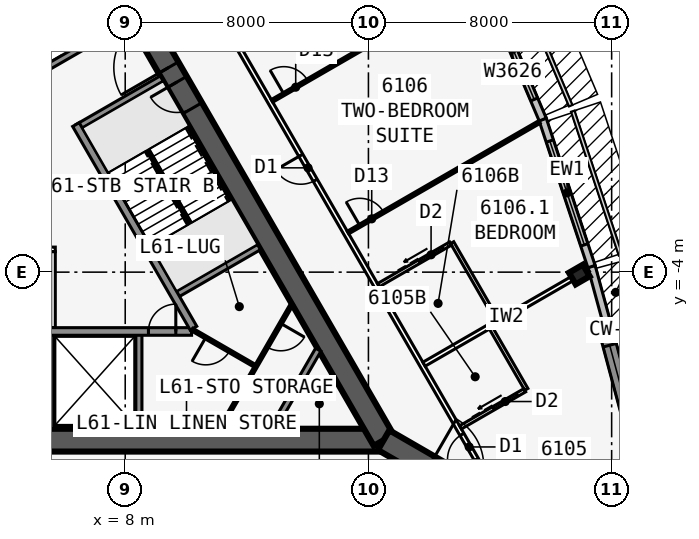
"""IFC4 building model, lengths in metres.
Left out: names, types, materials, properties, quantities, classifications, styles, units other than length and angle.
Written with IfcOpenShell. Run it as: python <this file> out.ifc"""

import sys

from ifc_helpers import new_model, si_unit, direction, frame, frame_2d, origin, origin_2d, place, context, subcontext, project, spatial, polyline, rectangle, i_section, outline, extrude, element, fill, save


model = new_model("IFC4")
c1 = context("Model", 3, precision=1e-05, world=origin(), true_north=direction((0.0, 1.0)))
c2 = subcontext(c1, "Body", "Model", "MODEL_VIEW")
j1 = project(units=[si_unit("LENGTHUNIT", "METRE"), si_unit("PLANEANGLEUNIT", "RADIAN")], contexts=[c1])
p1 = place(None, origin())
s1 = spatial("IfcSite", under=j1, at=p1, CompositionType="ELEMENT")
p2 = place(p1, origin())
s2 = spatial("IfcBuilding", under=s1, at=p2, CompositionType="ELEMENT")
p3 = place(p2, frame((0.0, 0.0, 229.7)))
s3 = spatial("IfcBuildingStorey", under=s2, at=p3, CompositionType="ELEMENT", Elevation=229.7)
p4 = place(p3, frame((-16.5, -9.526, 0.0), z_axis=(0.0, 0.0, 1.0), x_axis=(1.0, 0.0, 0.0)))
e1 = element("IfcWall", 1, at=p4, inside=s3, PredefinedType="SHEAR", context=c2, shape_type="SweptSolid", body=[
    extrude(rectangle(XDim=33.0, YDim=0.75, at=frame_2d((16.5, 0.0))), origin(), (0.0, 0.0, 1.0), 3.6),
])
p5 = place(p4, frame((14.05, 0.0, 0.0)))
e2 = element("IfcOpeningElement", 2, at=p5, cuts=e1, PredefinedType="OPENING", context=c2, shape_type="SweptSolid", body=[
    extrude(rectangle(XDim=1.8, YDim=2.13, at=frame_2d((0.9, 1.065))), frame((0.0, 0.385, 0.0), z_axis=(0.0, -1.0, 0.0), x_axis=(1.0, 0.0, 0.0)), (0.0, 0.0, 1.0), 0.77),
])
p6 = place(p3, frame((-0.55, -5.951, 0.0), z_axis=(0.0, 0.0, 1.0), x_axis=(1.0, 0.0, 0.0)))
e3 = element("IfcWall", 3, at=p6, inside=s3, PredefinedType="SOLIDWALL", context=c2, shape_type="SweptSolid", body=[
    extrude(rectangle(XDim=10.733, YDim=0.25, at=frame_2d((5.366, 0.0))), origin(), (0.0, 0.0, 1.0), 3.35),
])
p7 = place(p6, frame((9.314, 0.0, 0.0)))
e4 = element("IfcOpeningElement", 4, at=p7, cuts=e3, PredefinedType="OPENING", context=c2, shape_type="SweptSolid", body=[
    extrude(rectangle(XDim=0.9, YDim=2.13, at=frame_2d((0.45, 1.065))), frame((0.0, 0.135, 0.0), z_axis=(0.0, -1.0, 0.0), x_axis=(1.0, 0.0, 0.0)), (0.0, 0.0, 1.0), 0.27),
])
p8 = place(p6, frame((1.05, 0.0, 0.0)))
e5 = element("IfcOpeningElement", 5, at=p8, cuts=e3, PredefinedType="OPENING", context=c2, shape_type="SweptSolid", body=[
    extrude(rectangle(XDim=1.1, YDim=2.13, at=frame_2d((0.55, 1.065))), frame((0.0, 0.135, 0.0), z_axis=(0.0, -1.0, 0.0), x_axis=(1.0, 0.0, 0.0)), (0.0, 0.0, 1.0), 0.27),
])
p9 = place(p6, frame((4.05, 0.0, 0.0)))
e6 = element("IfcOpeningElement", 6, at=p9, cuts=e3, PredefinedType="OPENING", context=c2, shape_type="SweptSolid", body=[
    extrude(rectangle(XDim=1.1, YDim=2.13, at=frame_2d((0.55, 1.065))), frame((0.0, 0.135, 0.0), z_axis=(0.0, -1.0, 0.0), x_axis=(1.0, 0.0, 0.0)), (0.0, 0.0, 1.0), 0.27),
])
for number, where, z_axis, x_axis in (
    (7, (5.55, -5.951, 0.0), (0.0, 0.0, 1.0), (0.0, -1.0, 0.0)),
    (8, (8.45, -5.951, 0.0), (0.0, 0.0, 1.0), (0.0, -1.0, 0.0)),
):
    element("IfcWall", number, at=place(p3, frame(where, z_axis=z_axis, x_axis=x_axis)), inside=s3, PredefinedType="SOLIDWALL", context=c2, shape_type="SweptSolid", body=[
        extrude(rectangle(XDim=3.2, YDim=0.2, at=frame_2d((1.6, 0.0))), origin(), (0.0, 0.0, 1.0), 3.35),
    ])
p10 = place(p3, frame((16.5, -9.526, 0.0), z_axis=(0.0, 0.0, 1.0), x_axis=(-0.499999749417, 0.866025548458, 0.0)))
e9 = element("IfcWall", 9, at=p10, inside=s3, PredefinedType="SHEAR", context=c2, shape_type="SweptSolid", body=[
    extrude(rectangle(XDim=33.0, YDim=0.75, at=frame_2d((16.5, 0.0))), origin(), (0.0, 0.0, 1.0), 3.6),
])
p11 = place(p10, frame((14.15, 0.0, 0.0)))
e10 = element("IfcOpeningElement", 10, at=p11, cuts=e9, PredefinedType="OPENING", context=c2, shape_type="SweptSolid", body=[
    extrude(rectangle(XDim=1.8, YDim=2.13, at=frame_2d((0.9, 1.065))), frame((0.0, 0.385, 0.0), z_axis=(0.0, -1.0, 0.0), x_axis=(1.0, 0.0, 0.0)), (0.0, 0.0, 1.0), 0.77),
])
p12 = place(p10, frame((12.6, 0.0, 0.0)))
e11 = element("IfcOpeningElement", 11, at=p12, cuts=e9, PredefinedType="OPENING", context=c2, shape_type="SweptSolid", body=[
    extrude(rectangle(XDim=1.0, YDim=2.13, at=frame_2d((0.5, 1.065))), frame((0.0, 0.385, 0.0), z_axis=(0.0, -1.0, 0.0), x_axis=(1.0, 0.0, 0.0)), (0.0, 0.0, 1.0), 0.77),
])
p13 = place(p3, frame((10.245, -5.843, 0.0), z_axis=(0.0, 0.0, 1.0), x_axis=(-0.499993009313, 0.866029439822, 0.0)))
e12 = element("IfcWall", 12, at=p13, inside=s3, PredefinedType="SOLIDWALL", context=c2, shape_type="SweptSolid", body=[
    extrude(rectangle(XDim=7.733, YDim=0.25, at=frame_2d((3.866, 0.0))), origin(), (0.0, 0.0, 1.0), 3.35),
])
for number, where, z_axis, x_axis in (
    (13, (9.629, -4.775, 0.0), (0.0, 0.0, 1.0), (0.866, 0.5, 0.0)),
    (14, (6.429, 0.767, 0.0), (0.0, 0.0, 1.0), (0.866, 0.5, 0.0)),
):
    element("IfcWall", number, at=place(p3, frame(where, z_axis=z_axis, x_axis=x_axis)), inside=s3, PredefinedType="SOLIDWALL", context=c2, shape_type="SweptSolid", body=[
        extrude(rectangle(XDim=3.2, YDim=0.2, at=frame_2d((1.6, 0.0))), origin(), (0.0, 0.0, 1.0), 3.35),
    ])
p14 = place(p3, frame((5.329, 2.673, 0.0), z_axis=(0.0, 0.0, 1.0), x_axis=(0.866022944154, 0.50000426018, 0.0)))
e15 = element("IfcWall", 15, at=p14, inside=s3, PredefinedType="SOLIDWALL", context=c2, shape_type="SweptSolid", body=[
    extrude(rectangle(XDim=3.2, YDim=0.2, at=frame_2d((1.6, 0.0))), origin(), (0.0, 0.0, 1.0), 3.35),
])
p15 = place(p3, frame((16.5, -9.526, 0.0), z_axis=(0.0, 0.0, 1.0), x_axis=(0.866031398331, -0.499989616998, 0.0)))
e16 = element("IfcWall", 16, at=p15, inside=s3, PredefinedType="SHEAR", context=c2, shape_type="SweptSolid", body=[
    extrude(rectangle(XDim=4.746, YDim=0.75, at=frame_2d((2.373, 0.0))), origin(), (0.0, 0.0, 1.0), 3.6),
])
p16 = place(p15, frame((1.725, 0.0, 0.0)))
e17 = element("IfcOpeningElement", 17, at=p16, cuts=e16, PredefinedType="OPENING", context=c2, shape_type="SweptSolid", body=[
    extrude(rectangle(XDim=1.8, YDim=2.13, at=frame_2d((0.9, 1.065))), frame((0.0, 0.385, 0.0), z_axis=(0.0, -1.0, 0.0), x_axis=(1.0, 0.0, 0.0)), (0.0, 0.0, 1.0), 0.77),
])
p17 = place(p3, frame((22.937, -4.078, 0.0), z_axis=(0.0, 0.0, 1.0), x_axis=(-0.5, 0.866025403784, 0.0)))
e18 = element("IfcColumn", 18, at=p17, inside=s3, PredefinedType="COLUMN", context=c2, shape_type="SweptSolid", body=[
    extrude(i_section(OverallWidth=0.442, OverallDepth=0.531, WebThickness=0.066, FlangeThickness=0.106, at=origin_2d()), origin(), (0.0, 0.0, 1.0), 3.6),
])
p18 = place(p3, frame((23.783, -13.798, 0.0), z_axis=(0.0, 0.0, 1.0), x_axis=(0.258799282522, 0.96593112144, 0.0)))
e19 = element("IfcWall", 19, at=p18, inside=s3, PredefinedType="SOLIDWALL", context=c2, shape_type="SweptSolid", body=[
    extrude(outline(polyline([(4.184, 0.225), (0.509, 0.225), (0.479, 0.113), (0.059, 0.225), (0.0, 0.225), (0.0, -0.225), (4.184, -0.225), (4.184, 0.225)])), origin(), (0.0, 0.0, 1.0), 3.35),
])
p19 = place(p18, frame((1.071, 0.0, 0.45)))
e20 = element("IfcOpeningElement", 20, at=p19, cuts=e19, PredefinedType="OPENING", context=c2, shape_type="SweptSolid", body=[
    extrude(rectangle(XDim=2.4, YDim=2.6, at=frame_2d((1.2, 1.3))), frame((0.0, 0.235, 0.0), z_axis=(0.0, -1.0, 0.0), x_axis=(1.0, 0.0, 0.0)), (0.0, 0.0, 1.0), 0.47),
])
p20 = place(p3, frame((24.865, -9.873, 0.0), z_axis=(0.0, 0.0, 1.0), x_axis=(-0.258784695888, 0.965935029479, 0.0)))
e21 = element("IfcWall", 21, at=p20, inside=s3, PredefinedType="SOLIDWALL", context=c2, shape_type="SweptSolid", body=[
    extrude(rectangle(XDim=4.184, YDim=0.45, at=frame_2d((2.092, 0.0))), origin(), (0.0, 0.0, 1.0), 3.35),
])
p21 = place(p20, frame((0.592, 0.0, 0.45)))
e22 = element("IfcOpeningElement", 22, at=p21, cuts=e21, PredefinedType="OPENING", context=c2, shape_type="SweptSolid", body=[
    extrude(rectangle(XDim=3.0, YDim=2.6, at=frame_2d((1.5, 1.3))), frame((0.0, 0.235, 0.0), z_axis=(0.0, -1.0, 0.0), x_axis=(1.0, 0.0, 0.0)), (0.0, 0.0, 1.0), 0.47),
])
p22 = place(p3, frame((23.879, -5.806, 0.0), z_axis=(0.0, 0.0, 1.0), x_axis=(-0.262867703986, 0.964831887015, 0.0)))
e23 = element("IfcWall", 23, at=p22, inside=s3, PredefinedType="STANDARD", context=c2, shape_type="SweptSolid", body=[
    extrude(rectangle(XDim=2.068, YDim=0.25, at=frame_2d((1.034, 0.0))), origin(), (0.0, 0.0, 1.0), 3.35),
])
p23 = place(p3, frame((23.338, -3.817, 0.0), z_axis=(0.0, 0.0, 1.0), x_axis=(-0.315108478109, 0.949055660656, 0.0)))
e24 = element("IfcWall", 24, at=p23, inside=s3, PredefinedType="STANDARD", context=c2, shape_type="SweptSolid", body=[
    extrude(rectangle(XDim=5.105, YDim=0.25, at=frame_2d((2.552, 0.0))), origin(), (0.0, 0.0, 1.0), 3.35),
])
p24 = place(p23, frame((0.752, 0.0, 0.45)))
e25 = element("IfcOpeningElement", 25, at=p24, cuts=e24, PredefinedType="OPENING", context=c2, shape_type="SweptSolid", body=[
    extrude(rectangle(XDim=3.6, YDim=2.6, at=frame_2d((1.8, 1.3))), frame((0.0, 0.135, 0.0), z_axis=(0.0, -1.0, 0.0), x_axis=(1.0, 0.0, 0.0)), (0.0, 0.0, 1.0), 0.27),
])
p25 = place(p3, frame((21.733, 1.018, 0.0), z_axis=(0.0, 0.0, 1.0), x_axis=(-0.390096809471, 0.920773848044, 0.0)))
e26 = element("IfcWall", 26, at=p25, inside=s3, PredefinedType="STANDARD", context=c2, shape_type="SweptSolid", body=[
    extrude(rectangle(XDim=5.038, YDim=0.25, at=frame_2d((2.519, 0.0))), origin(), (0.0, 0.0, 1.0), 3.35),
])
p26 = place(p25, frame((0.719, 0.0, 0.45)))
e27 = element("IfcOpeningElement", 27, at=p26, cuts=e26, PredefinedType="OPENING", context=c2, shape_type="SweptSolid", body=[
    extrude(rectangle(XDim=3.6, YDim=2.6, at=frame_2d((1.8, 1.3))), frame((0.0, 0.135, 0.0), z_axis=(0.0, -1.0, 0.0), x_axis=(1.0, 0.0, 0.0)), (0.0, 0.0, 1.0), 0.27),
])
p27 = place(p3, frame((20.102, -11.115, 0.0), z_axis=(0.0, 0.0, 1.0), x_axis=(-0.500000265775, 0.866025250339, 0.0)))
e28 = element("IfcWall", 28, at=p27, inside=s3, PredefinedType="PARTITIONING", context=c2, shape_type="SweptSolid", body=[
    extrude(rectangle(XDim=39.354, YDim=0.15, at=frame_2d((19.677, 0.0))), origin(), (0.0, 0.0, 1.0), 3.35),
])
p28 = place(p27, frame((1.102, 0.0, 0.0)))
e29 = element("IfcOpeningElement", 29, at=p28, cuts=e28, PredefinedType="OPENING", context=c2, shape_type="SweptSolid", body=[
    extrude(rectangle(XDim=0.95, YDim=2.13, at=frame_2d((0.475, 1.065))), frame((0.0, 0.085, 0.0), z_axis=(0.0, -1.0, 0.0), x_axis=(1.0, 0.0, 0.0)), (0.0, 0.0, 1.0), 0.17),
])
p29 = place(p27, frame((11.702, 0.0, 0.0)))
e30 = element("IfcOpeningElement", 30, at=p29, cuts=e28, PredefinedType="OPENING", context=c2, shape_type="SweptSolid", body=[
    extrude(rectangle(XDim=0.95, YDim=2.13, at=frame_2d((0.475, 1.065))), frame((0.0, 0.085, 0.0), z_axis=(0.0, -1.0, 0.0), x_axis=(1.0, 0.0, 0.0)), (0.0, 0.0, 1.0), 0.17),
])
p30 = place(p27, frame((26.702, 0.0, 0.0)))
e31 = element("IfcOpeningElement", 31, at=p30, cuts=e28, PredefinedType="OPENING", context=c2, shape_type="SweptSolid", body=[
    extrude(rectangle(XDim=0.95, YDim=2.13, at=frame_2d((0.475, 1.065))), frame((0.0, 0.085, 0.0), z_axis=(0.0, -1.0, 0.0), x_axis=(1.0, 0.0, 0.0)), (0.0, 0.0, 1.0), 0.17),
])
p31 = place(p27, frame((37.302, 0.0, 0.0)))
e32 = element("IfcOpeningElement", 32, at=p31, cuts=e28, PredefinedType="OPENING", context=c2, shape_type="SweptSolid", body=[
    extrude(rectangle(XDim=0.95, YDim=2.13, at=frame_2d((0.475, 1.065))), frame((0.0, 0.085, 0.0), z_axis=(0.0, -1.0, 0.0), x_axis=(1.0, 0.0, 0.0)), (0.0, 0.0, 1.0), 0.17),
])
p32 = place(p3, frame((17.829, -7.027, 0.0), z_axis=(0.0, 0.0, 1.0), x_axis=(0.866026604282, 0.499997920671, 0.0)))
e33 = element("IfcWall", 33, at=p32, inside=s3, PredefinedType="PARTITIONING", context=c2, shape_type="SweptSolid", body=[
    extrude(rectangle(XDim=6.24, YDim=0.15, at=frame_2d((3.12, 0.0))), origin(), (0.0, 0.0, 1.0), 2.25),
])
p33 = place(p3, frame((15.329, -2.697, 0.0), z_axis=(0.0, 0.0, 1.0), x_axis=(0.866032413668, 0.499987858329, 0.0)))
e34 = element("IfcWall", 34, at=p33, inside=s3, PredefinedType="PARTITIONING", context=c2, shape_type="SweptSolid", body=[
    extrude(rectangle(XDim=7.273, YDim=0.1, at=frame_2d((3.636, 0.0))), origin(), (0.0, 0.0, 1.0), 2.309),
])
p34 = place(p33, frame((0.45, 0.0, 0.0)))
e35 = element("IfcOpeningElement", 35, at=p34, cuts=e34, PredefinedType="OPENING", context=c2, shape_type="SweptSolid", body=[
    extrude(rectangle(XDim=0.9, YDim=2.13, at=frame_2d((0.45, 1.065))), frame((0.0, 0.06, 0.0), z_axis=(0.0, -1.0, 0.0), x_axis=(1.0, 0.0, 0.0)), (0.0, 0.0, 1.0), 0.12),
])
p35 = place(p3, frame((12.829, 1.633, 0.0), z_axis=(0.0, 0.0, 1.0), x_axis=(0.866030558329, 0.49999107196, 0.0)))
e36 = element("IfcWall", 36, at=p35, inside=s3, PredefinedType="PARTITIONING", context=c2, shape_type="SweptSolid", body=[
    extrude(rectangle(XDim=7.894, YDim=0.1, at=frame_2d((3.947, 0.0))), origin(), (0.0, 0.0, 1.0), 2.25),
])
p36 = place(p35, frame((0.45, 0.0, 0.0)))
e37 = element("IfcOpeningElement", 37, at=p36, cuts=e36, PredefinedType="OPENING", context=c2, shape_type="SweptSolid", body=[
    extrude(rectangle(XDim=0.9, YDim=2.13, at=frame_2d((0.45, 1.065))), frame((0.0, 0.06, 0.0), z_axis=(0.0, -1.0, 0.0), x_axis=(1.0, 0.0, 0.0)), (0.0, 0.0, 1.0), 0.12),
])
p37 = place(p3, frame((21.194, -7.856, 0.0), z_axis=(0.0, 0.0, 1.0), x_axis=(-0.500033551112, 0.866006032174, 0.0)))
e38 = element("IfcWall", 38, at=p37, inside=s3, PredefinedType="PLUMBINGWALL", context=c2, shape_type="SweptSolid", body=[
    extrude(rectangle(XDim=2.4, YDim=0.12, at=frame_2d((1.2, 0.0))), origin(), (0.0, 0.0, 1.0), 3.35),
])
p38 = place(p3, frame((19.029, -9.106, 0.0), z_axis=(0.0, 0.0, 1.0), x_axis=(0.866023955769, 0.500002508028, 0.0)))
e39 = element("IfcWall", 39, at=p38, inside=s3, PredefinedType="PLUMBINGWALL", context=c2, shape_type="SweptSolid", body=[
    extrude(rectangle(XDim=2.44, YDim=0.12, at=frame_2d((1.22, 0.0))), origin(), (0.0, 0.0, 1.0), 3.35),
])
p39 = place(p38, frame((1.25, 0.0, 0.0)))
e40 = element("IfcOpeningElement", 40, at=p39, cuts=e39, PredefinedType="OPENING", context=c2, shape_type="SweptSolid", body=[
    extrude(rectangle(XDim=0.9, YDim=2.13, at=frame_2d((0.45, 1.065))), frame((0.0, 0.07, 0.0), z_axis=(0.0, -1.0, 0.0), x_axis=(1.0, 0.0, 0.0)), (0.0, 0.0, 1.0), 0.14),
])
p40 = place(p3, frame((20.253, -5.627, 0.0), z_axis=(0.0, 0.0, 1.0), x_axis=(-0.50002537861, 0.866010750942, 0.0)))
e41 = element("IfcWall", 41, at=p40, inside=s3, PredefinedType="PLUMBINGWALL", context=c2, shape_type="SweptSolid", body=[
    extrude(rectangle(XDim=3.0, YDim=0.12, at=frame_2d((1.5, 0.0))), origin(), (0.0, 0.0, 1.0), 3.35),
])
p41 = place(p3, frame((16.329, -4.429, 0.0), z_axis=(0.0, 0.0, 1.0), x_axis=(0.865997131366, 0.500048966069, 0.0)))
e42 = element("IfcWall", 42, at=p41, inside=s3, PredefinedType="PLUMBINGWALL", context=c2, shape_type="SweptSolid", body=[
    extrude(rectangle(XDim=2.74, YDim=0.12, at=frame_2d((1.37, 0.0))), origin(), (0.0, 0.0, 1.0), 3.35),
])
p42 = place(p41, frame((1.55, 0.0, 0.0)))
e43 = element("IfcOpeningElement", 43, at=p42, cuts=e42, PredefinedType="OPENING", context=c2, shape_type="SweptSolid", body=[
    extrude(rectangle(XDim=0.9, YDim=2.13, at=frame_2d((0.45, 1.065))), frame((0.0, 0.07, 0.0), z_axis=(0.0, -1.0, 0.0), x_axis=(1.0, 0.0, 0.0)), (0.0, 0.0, 1.0), 0.14),
])
p43 = place(p3, frame((-2.65, -3.251, 0.0), z_axis=(0.0, 0.0, 1.0), x_axis=(1.0, 0.0, 0.0)))
e44 = element("IfcWall", 44, at=p43, inside=s3, PredefinedType="PARTITIONING", context=c2, shape_type="SweptSolid", body=[
    extrude(rectangle(XDim=8.35, YDim=0.15, at=frame_2d((4.175, 0.0))), origin(), (0.0, 0.0, 1.0), 3.35),
])
p44 = place(p3, frame((5.625, -5.826, 0.0), z_axis=(0.0, 0.0, 1.0), x_axis=(0.0, 1.0, 0.0)))
e45 = element("IfcWall", 45, at=p44, inside=s3, PredefinedType="PARTITIONING", context=c2, shape_type="SweptSolid", body=[
    extrude(rectangle(XDim=2.5, YDim=0.15, at=frame_2d((1.25, 0.0))), origin(), (0.0, 0.0, 1.0), 3.35),
])
p45 = place(p3, frame((14.349, -6.551, 0.0), z_axis=(0.0, 0.0, 1.0), x_axis=(-0.499952404951, -0.866052881055, 0.0)))
e46 = element("IfcWall", 46, at=p45, inside=s3, PredefinedType="SOLIDWALL", context=c2, shape_type="SweptSolid", body=[
    extrude(rectangle(XDim=3.002, YDim=0.2, at=frame_2d((1.501, 0.0))), origin(), (0.0, 0.0, 1.0), 3.35),
])
p46 = place(p3, frame((13.483, -5.051, 0.0), z_axis=(0.0, 0.0, 1.0), x_axis=(-0.499999210213, -0.866025859768, 0.0)))
e47 = element("IfcWall", 47, at=p46, inside=s3, PredefinedType="PARTITIONING", context=c2, shape_type="SweptSolid", body=[
    extrude(rectangle(XDim=4.734, YDim=0.1, at=frame_2d((2.367, 0.0))), origin(), (0.0, 0.0, 1.0), 3.35),
])
p47 = place(p46, frame((0.734, 0.0, 0.0)))
e48 = element("IfcOpeningElement", 48, at=p47, cuts=e47, PredefinedType="OPENING", context=c2, shape_type="SweptSolid", body=[
    extrude(rectangle(XDim=0.9, YDim=2.13, at=frame_2d((0.45, 1.065))), frame((0.0, 0.06, 0.0), z_axis=(0.0, -1.0, 0.0), x_axis=(1.0, 0.0, 0.0)), (0.0, 0.0, 1.0), 0.12),
])
p48 = place(p3, frame((12.3, -7.101, 0.0), z_axis=(0.0, 0.0, 1.0), x_axis=(-0.866022978719, 0.500004200313, 0.0)))
e49 = element("IfcWall", 49, at=p48, inside=s3, PredefinedType="PARTITIONING", context=c2, shape_type="SweptSolid", body=[
    extrude(rectangle(XDim=2.425, YDim=0.1, at=frame_2d((1.213, 0.0))), origin(), (0.0, 0.0, 1.0), 3.35),
])
p49 = place(p48, frame((1.005, 0.0, 0.0)))
e50 = element("IfcOpeningElement", 50, at=p49, cuts=e49, PredefinedType="OPENING", context=c2, shape_type="SweptSolid", body=[
    extrude(rectangle(XDim=0.9, YDim=2.13, at=frame_2d((0.45, 1.065))), frame((0.0, 0.06, 0.0), z_axis=(0.0, -1.0, 0.0), x_axis=(1.0, 0.0, 0.0)), (0.0, 0.0, 1.0), 0.12),
])
p50 = place(p3, frame((10.135, -2.401, 0.0), z_axis=(0.0, 0.0, 1.0), x_axis=(-0.499992232847, 0.866029888106, 0.0)))
e51 = element("IfcWall", 51, at=p50, inside=s3, PredefinedType="SOLIDWALL", context=c2, shape_type="SweptSolid", body=[
    extrude(rectangle(XDim=2.794, YDim=0.1, at=frame_2d((1.397, 0.0))), origin(), (0.0, 0.0, 1.0), 3.6),
])
p51 = place(p21, origin())
e52 = element("IfcWindow", 52, at=p51, inside=s3, PartitioningType="SINGLE_PANEL", PredefinedType="WINDOW", context=c2, shape_type="SweptSolid", body=[
    extrude(rectangle(XDim=3.0, YDim=2.6, at=frame_2d((1.5, 1.3))), frame((0.0, 0.03, 0.0), z_axis=(0.0, -1.0, 0.0), x_axis=(1.0, 0.0, 0.0)), (0.0, 0.0, 1.0), 0.06),
])
fill(e22, e52)
p52 = place(p24, origin())
e53 = element("IfcWindow", 53, at=p52, inside=s3, PartitioningType="SINGLE_PANEL", PredefinedType="WINDOW", context=c2, shape_type="SweptSolid", body=[
    extrude(rectangle(XDim=3.6, YDim=2.6, at=frame_2d((1.8, 1.3))), frame((0.0, 0.03, 0.0), z_axis=(0.0, -1.0, 0.0), x_axis=(1.0, 0.0, 0.0)), (0.0, 0.0, 1.0), 0.06),
])
fill(e25, e53)
p53 = place(p26, origin())
e54 = element("IfcWindow", 54, at=p53, inside=s3, PartitioningType="SINGLE_PANEL", PredefinedType="WINDOW", context=c2, shape_type="SweptSolid", body=[
    extrude(rectangle(XDim=3.6, YDim=2.6, at=frame_2d((1.8, 1.3))), frame((0.0, 0.03, 0.0), z_axis=(0.0, -1.0, 0.0), x_axis=(1.0, 0.0, 0.0)), (0.0, 0.0, 1.0), 0.06),
])
fill(e27, e54)
p54 = place(p34, origin())
e55 = element("IfcDoor", 55, at=p54, inside=s3, OperationType="SINGLE_SWING_LEFT", PredefinedType="DOOR", context=c2, shape_type="SweptSolid", body=[
    extrude(rectangle(XDim=0.9, YDim=2.13, at=frame_2d((0.45, 1.065))), frame((0.0, 0.025, 0.0), z_axis=(0.0, -1.0, 0.0), x_axis=(1.0, 0.0, 0.0)), (0.0, 0.0, 1.0), 0.05),
])
fill(e35, e55)
p55 = place(p36, origin())
e56 = element("IfcDoor", 56, at=p55, inside=s3, OperationType="SINGLE_SWING_LEFT", PredefinedType="DOOR", context=c2, shape_type="SweptSolid", body=[
    extrude(rectangle(XDim=0.9, YDim=2.13, at=frame_2d((0.45, 1.065))), frame((0.0, 0.025, 0.0), z_axis=(0.0, -1.0, 0.0), x_axis=(1.0, 0.0, 0.0)), (0.0, 0.0, 1.0), 0.05),
])
fill(e37, e56)
p56 = place(p39, origin())
e57 = element("IfcDoor", 57, at=p56, inside=s3, OperationType="SLIDING_TO_LEFT", PredefinedType="DOOR", context=c2, shape_type="SweptSolid", body=[
    extrude(rectangle(XDim=0.9, YDim=2.13, at=frame_2d((0.45, 1.065))), frame((0.0, 0.025, 0.0), z_axis=(0.0, -1.0, 0.0), x_axis=(1.0, 0.0, 0.0)), (0.0, 0.0, 1.0), 0.05),
])
fill(e40, e57)
p57 = place(p28, origin())
e58 = element("IfcDoor", 58, at=p57, inside=s3, OperationType="SINGLE_SWING_LEFT", PredefinedType="DOOR", context=c2, shape_type="SweptSolid", body=[
    extrude(rectangle(XDim=0.95, YDim=2.13, at=frame_2d((0.475, 1.065))), frame((0.0, 0.025, 0.0), z_axis=(0.0, -1.0, 0.0), x_axis=(1.0, 0.0, 0.0)), (0.0, 0.0, 1.0), 0.05),
])
fill(e29, e58)
p58 = place(p42, origin())
e59 = element("IfcDoor", 59, at=p58, inside=s3, OperationType="SLIDING_TO_LEFT", PredefinedType="DOOR", context=c2, shape_type="SweptSolid", body=[
    extrude(rectangle(XDim=0.9, YDim=2.13, at=frame_2d((0.45, 1.065))), frame((0.0, 0.025, 0.0), z_axis=(0.0, -1.0, 0.0), x_axis=(1.0, 0.0, 0.0)), (0.0, 0.0, 1.0), 0.05),
])
fill(e43, e59)
p59 = place(p29, origin())
e60 = element("IfcDoor", 60, at=p59, inside=s3, OperationType="SINGLE_SWING_RIGHT", PredefinedType="DOOR", context=c2, shape_type="SweptSolid", body=[
    extrude(rectangle(XDim=0.95, YDim=2.13, at=frame_2d((0.475, 1.065))), frame((0.0, 0.025, 0.0), z_axis=(0.0, -1.0, 0.0), x_axis=(1.0, 0.0, 0.0)), (0.0, 0.0, 1.0), 0.05),
])
fill(e30, e60)
p60 = place(p11, origin())
e61 = element("IfcDoor", 61, at=p60, inside=s3, OperationType="DOUBLE_DOOR_SINGLE_SWING", PredefinedType="DOOR", context=c2, shape_type="SweptSolid", body=[
    extrude(rectangle(XDim=1.8, YDim=2.13, at=frame_2d((0.9, 1.065))), frame((0.0, 0.025, 0.0), z_axis=(0.0, -1.0, 0.0), x_axis=(1.0, 0.0, 0.0)), (0.0, 0.0, 1.0), 0.05),
])
fill(e10, e61)
p61 = place(p12, origin())
e62 = element("IfcDoor", 62, at=p61, inside=s3, OperationType="SINGLE_SWING_RIGHT", PredefinedType="DOOR", context=c2, shape_type="SweptSolid", body=[
    extrude(rectangle(XDim=1.0, YDim=2.13, at=frame_2d((0.5, 1.065))), frame((0.0, 0.025, 0.0), z_axis=(0.0, -1.0, 0.0), x_axis=(1.0, 0.0, 0.0)), (0.0, 0.0, 1.0), 0.05),
])
fill(e11, e62)
p62 = place(p47, origin())
e63 = element("IfcDoor", 63, at=p62, inside=s3, OperationType="SINGLE_SWING_LEFT", PredefinedType="DOOR", context=c2, shape_type="SweptSolid", body=[
    extrude(rectangle(XDim=0.9, YDim=2.13, at=frame_2d((0.45, 1.065))), frame((0.0, 0.025, 0.0), z_axis=(0.0, -1.0, 0.0), x_axis=(1.0, 0.0, 0.0)), (0.0, 0.0, 1.0), 0.05),
])
fill(e48, e63)
p63 = place(p7, origin())
e64 = element("IfcDoor", 64, at=p63, inside=s3, OperationType="SINGLE_SWING_RIGHT", PredefinedType="DOOR", context=c2, shape_type="SweptSolid", body=[
    extrude(rectangle(XDim=0.9, YDim=2.13, at=frame_2d((0.45, 1.065))), frame((0.0, 0.025, 0.0), z_axis=(0.0, -1.0, 0.0), x_axis=(1.0, 0.0, 0.0)), (0.0, 0.0, 1.0), 0.05),
])
fill(e4, e64)
p64 = place(p49, origin())
e65 = element("IfcDoor", 65, at=p64, inside=s3, OperationType="SINGLE_SWING_RIGHT", PredefinedType="DOOR", context=c2, shape_type="SweptSolid", body=[
    extrude(rectangle(XDim=0.9, YDim=2.13, at=frame_2d((0.45, 1.065))), frame((0.0, 0.025, 0.0), z_axis=(0.0, -1.0, 0.0), x_axis=(1.0, 0.0, 0.0)), (0.0, 0.0, 1.0), 0.05),
])
fill(e50, e65)
save(model, sys.argv[1])
